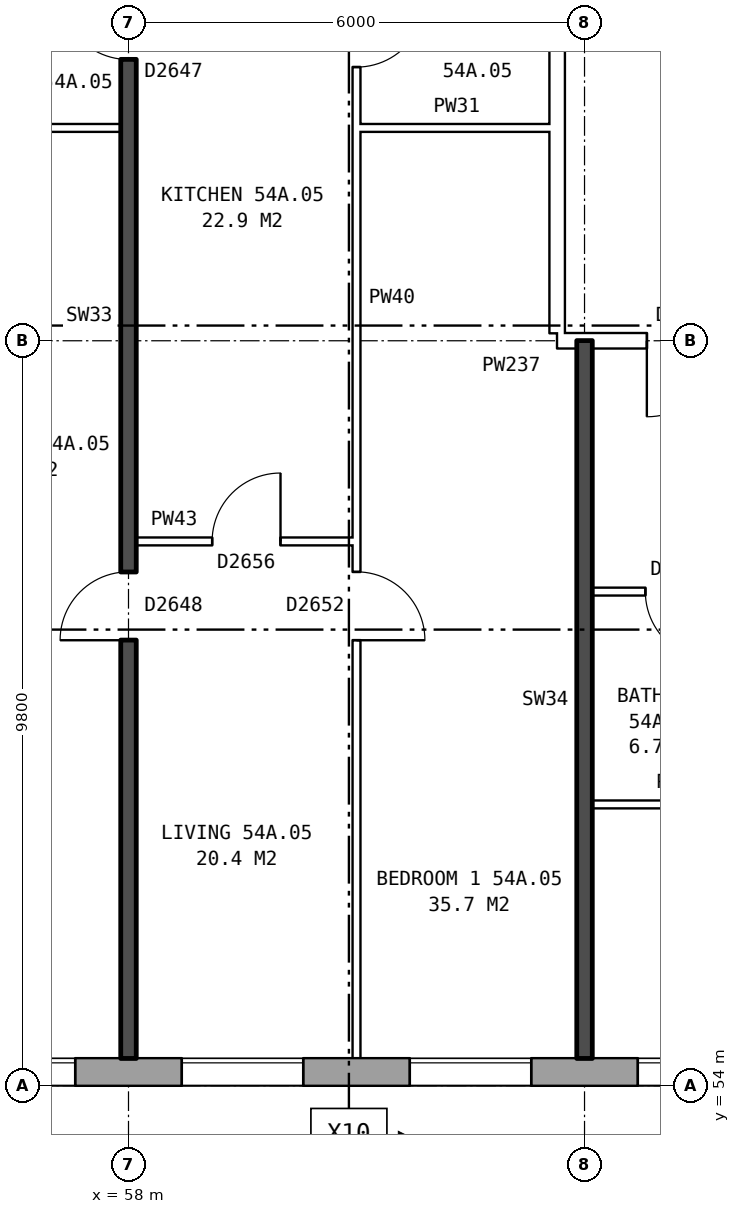
"""IFC4 building model, lengths in metres.
Left out: names, types, materials, properties, quantities, classifications, styles, units other than length and angle.
Written with IfcOpenShell. Run it as: python <this file> out.ifc"""

import sys

from ifc_helpers import new_model, si_unit, direction, frame, frame_2d, origin, place, context, subcontext, project, spatial, rectangle, extrude, element, fill, save


model = new_model("IFC4")
c1 = context("Model", 3, precision=1e-05, world=origin(), true_north=direction((0.0, 1.0)))
c2 = subcontext(c1, "Body", "Model", "MODEL_VIEW")
j1 = project(units=[si_unit("LENGTHUNIT", "METRE"), si_unit("PLANEANGLEUNIT", "RADIAN")], contexts=[c1])
p1 = place(None, origin())
s1 = spatial("IfcSite", under=j1, at=p1, CompositionType="ELEMENT")
p2 = place(p1, origin())
s2 = spatial("IfcBuilding", under=s1, at=p2, CompositionType="ELEMENT")
p3 = place(p2, frame((0.0, 0.0, 191.3)))
s3 = spatial("IfcBuildingStorey", under=s2, at=p3, CompositionType="ELEMENT", Elevation=191.3)
p4 = place(p3, frame((33.325, 54.18, 0.0), z_axis=(0.0, 0.0, 1.0), x_axis=(1.0, 0.0, 0.0)))
e1 = element("IfcWall", 1, at=p4, inside=s3, PredefinedType="STANDARD", context=c2, shape_type="SweptSolid", body=[
    extrude(rectangle(XDim=39.601, YDim=0.36, at=frame_2d((19.8, 0.0))), origin(), (0.0, 0.0, 1.0), 2.85),
])
p5 = place(p4, frame((1.375, 0.0, 0.8)))
e2 = element("IfcOpeningElement", 2, at=p5, cuts=e1, PredefinedType="OPENING", context=c2, shape_type="SweptSolid", body=[
    extrude(rectangle(XDim=1.6, YDim=1.8, at=frame_2d((0.8, 0.9))), frame((0.0, 0.19, 0.0), z_axis=(0.0, -1.0, 0.0), x_axis=(1.0, 0.0, 0.0)), (0.0, 0.0, 1.0), 0.38),
])
p6 = place(p4, frame((4.375, 0.0, 0.8)))
e3 = element("IfcOpeningElement", 3, at=p6, cuts=e1, PredefinedType="OPENING", context=c2, shape_type="SweptSolid", body=[
    extrude(rectangle(XDim=1.6, YDim=1.8, at=frame_2d((0.8, 0.9))), frame((0.0, 0.19, 0.0), z_axis=(0.0, -1.0, 0.0), x_axis=(1.0, 0.0, 0.0)), (0.0, 0.0, 1.0), 0.38),
])
p7 = place(p4, frame((7.375, 0.0, 0.8)))
e4 = element("IfcOpeningElement", 4, at=p7, cuts=e1, PredefinedType="OPENING", context=c2, shape_type="SweptSolid", body=[
    extrude(rectangle(XDim=1.6, YDim=1.8, at=frame_2d((0.8, 0.9))), frame((0.0, 0.19, 0.0), z_axis=(0.0, -1.0, 0.0), x_axis=(1.0, 0.0, 0.0)), (0.0, 0.0, 1.0), 0.38),
])
p8 = place(p4, frame((10.375, 0.0, 0.8)))
e5 = element("IfcOpeningElement", 5, at=p8, cuts=e1, PredefinedType="OPENING", context=c2, shape_type="SweptSolid", body=[
    extrude(rectangle(XDim=1.6, YDim=1.8, at=frame_2d((0.8, 0.9))), frame((0.0, 0.19, 0.0), z_axis=(0.0, -1.0, 0.0), x_axis=(1.0, 0.0, 0.0)), (0.0, 0.0, 1.0), 0.38),
])
p9 = place(p4, frame((13.375, 0.0, 0.8)))
e6 = element("IfcOpeningElement", 6, at=p9, cuts=e1, PredefinedType="OPENING", context=c2, shape_type="SweptSolid", body=[
    extrude(rectangle(XDim=1.6, YDim=1.8, at=frame_2d((0.8, 0.9))), frame((0.0, 0.19, 0.0), z_axis=(0.0, -1.0, 0.0), x_axis=(1.0, 0.0, 0.0)), (0.0, 0.0, 1.0), 0.38),
])
p10 = place(p4, frame((15.825, 0.0, 0.8)))
e7 = element("IfcOpeningElement", 7, at=p10, cuts=e1, PredefinedType="OPENING", context=c2, shape_type="SweptSolid", body=[
    extrude(rectangle(XDim=1.4, YDim=1.8, at=frame_2d((0.7, 0.9))), frame((0.0, 0.19, 0.0), z_axis=(0.0, -1.0, 0.0), x_axis=(1.0, 0.0, 0.0)), (0.0, 0.0, 1.0), 0.38),
])
p11 = place(p4, frame((18.975, 0.0, 0.15)))
e8 = element("IfcOpeningElement", 8, at=p11, cuts=e1, PredefinedType="OPENING", context=c2, shape_type="SweptSolid", body=[
    extrude(rectangle(XDim=1.6, YDim=1.2, at=frame_2d((0.8, 0.6))), frame((0.0, 0.19, 0.0), z_axis=(0.0, -1.0, 0.0), x_axis=(1.0, 0.0, 0.0)), (0.0, 0.0, 1.0), 0.38),
])
p12 = place(p4, frame((22.375, 0.0, 0.8)))
e9 = element("IfcOpeningElement", 9, at=p12, cuts=e1, PredefinedType="OPENING", context=c2, shape_type="SweptSolid", body=[
    extrude(rectangle(XDim=1.6, YDim=1.8, at=frame_2d((0.8, 0.9))), frame((0.0, 0.19, 0.0), z_axis=(0.0, -1.0, 0.0), x_axis=(1.0, 0.0, 0.0)), (0.0, 0.0, 1.0), 0.38),
])
p13 = place(p4, frame((25.375, 0.0, 0.8)))
e10 = element("IfcOpeningElement", 10, at=p13, cuts=e1, PredefinedType="OPENING", context=c2, shape_type="SweptSolid", body=[
    extrude(rectangle(XDim=1.6, YDim=1.8, at=frame_2d((0.8, 0.9))), frame((0.0, 0.19, 0.0), z_axis=(0.0, -1.0, 0.0), x_axis=(1.0, 0.0, 0.0)), (0.0, 0.0, 1.0), 0.38),
])
p14 = place(p4, frame((28.375, 0.0, 0.8)))
e11 = element("IfcOpeningElement", 11, at=p14, cuts=e1, PredefinedType="OPENING", context=c2, shape_type="SweptSolid", body=[
    extrude(rectangle(XDim=1.6, YDim=1.8, at=frame_2d((0.8, 0.9))), frame((0.0, 0.19, 0.0), z_axis=(0.0, -1.0, 0.0), x_axis=(1.0, 0.0, 0.0)), (0.0, 0.0, 1.0), 0.38),
])
p15 = place(p4, frame((31.375, 0.0, 0.8)))
e12 = element("IfcOpeningElement", 12, at=p15, cuts=e1, PredefinedType="OPENING", context=c2, shape_type="SweptSolid", body=[
    extrude(rectangle(XDim=1.6, YDim=1.8, at=frame_2d((0.8, 0.9))), frame((0.0, 0.19, 0.0), z_axis=(0.0, -1.0, 0.0), x_axis=(1.0, 0.0, 0.0)), (0.0, 0.0, 1.0), 0.38),
])
p16 = place(p4, frame((34.375, 0.0, 0.8)))
e13 = element("IfcOpeningElement", 13, at=p16, cuts=e1, PredefinedType="OPENING", context=c2, shape_type="SweptSolid", body=[
    extrude(rectangle(XDim=1.6, YDim=1.8, at=frame_2d((0.8, 0.9))), frame((0.0, 0.19, 0.0), z_axis=(0.0, -1.0, 0.0), x_axis=(1.0, 0.0, 0.0)), (0.0, 0.0, 1.0), 0.38),
])
p17 = place(p4, frame((37.375, 0.0, 0.8)))
e14 = element("IfcOpeningElement", 14, at=p17, cuts=e1, PredefinedType="OPENING", context=c2, shape_type="SweptSolid", body=[
    extrude(rectangle(XDim=1.6, YDim=1.8, at=frame_2d((0.8, 0.9))), frame((0.0, 0.19, 0.0), z_axis=(0.0, -1.0, 0.0), x_axis=(1.0, 0.0, 0.0)), (0.0, 0.0, 1.0), 0.38),
])
p18 = place(p4, frame((17.525, 0.0, 1.6)))
e15 = element("IfcOpeningElement", 15, at=p18, cuts=e1, PredefinedType="OPENING", context=c2, shape_type="SweptSolid", body=[
    extrude(rectangle(XDim=0.6, YDim=0.9, at=frame_2d((0.3, 0.45))), frame((0.0, 0.19, 0.0), z_axis=(0.0, -1.0, 0.0), x_axis=(1.0, 0.0, 0.0)), (0.0, 0.0, 1.0), 0.38),
])
p19 = place(p3, frame((63.64, 63.9, 0.0), z_axis=(0.0, 0.0, 1.0), x_axis=(0.0, 1.0, 0.0)))
e16 = element("IfcWall", 16, at=p19, inside=s3, PredefinedType="PARTITIONING", context=c2, shape_type="SweptSolid", body=[
    extrude(rectangle(XDim=12.2, YDim=0.2, at=frame_2d((6.1, 0.0))), origin(), (0.0, 0.0, 1.0), 2.85),
])
p20 = place(p19, frame((5.1, 0.0, 0.0)))
e17 = element("IfcOpeningElement", 17, at=p20, cuts=e16, PredefinedType="OPENING", context=c2, shape_type="SweptSolid", body=[
    extrude(rectangle(XDim=2.0, YDim=2.1, at=frame_2d((1.0, 1.05))), frame((0.0, 0.11, 0.0), z_axis=(0.0, -1.0, 0.0), x_axis=(1.0, 0.0, 0.0)), (0.0, 0.0, 1.0), 0.22),
])
p21 = place(p3, frame((64.1, 57.7, 0.0), z_axis=(0.0, 0.0, 1.0), x_axis=(1.0, 0.0, 0.0)))
e18 = element("IfcWall", 18, at=p21, inside=s3, PredefinedType="PARTITIONING", context=c2, shape_type="SweptSolid", body=[
    extrude(rectangle(XDim=2.3, YDim=0.1, at=frame_2d((1.15, 0.0))), origin(), (0.0, 0.0, 1.0), 2.85),
])
p22 = place(p3, frame((64.1, 60.5, 0.0), z_axis=(0.0, 0.0, 1.0), x_axis=(1.0, 0.0, 0.0)))
e19 = element("IfcWall", 19, at=p22, inside=s3, PredefinedType="PARTITIONING", context=c2, shape_type="SweptSolid", body=[
    extrude(rectangle(XDim=5.8, YDim=0.1, at=frame_2d((2.9, 0.0))), origin(), (0.0, 0.0, 1.0), 2.85),
])
p23 = place(p22, frame((3.6, 0.0, 0.0)))
e20 = element("IfcOpeningElement", 20, at=p23, cuts=e19, PredefinedType="OPENING", context=c2, shape_type="SweptSolid", body=[
    extrude(rectangle(XDim=0.9, YDim=2.1, at=frame_2d((0.45, 1.05))), frame((0.0, 0.06, 0.0), z_axis=(0.0, -1.0, 0.0), x_axis=(1.0, 0.0, 0.0)), (0.0, 0.0, 1.0), 0.12),
])
p24 = place(p22, frame((0.7, 0.0, 0.0)))
e21 = element("IfcOpeningElement", 21, at=p24, cuts=e19, PredefinedType="OPENING", context=c2, shape_type="SweptSolid", body=[
    extrude(rectangle(XDim=0.9, YDim=2.1, at=frame_2d((0.45, 1.05))), frame((0.0, 0.06, 0.0), z_axis=(0.0, -1.0, 0.0), x_axis=(1.0, 0.0, 0.0)), (0.0, 0.0, 1.0), 0.12),
])
p25 = place(p3, frame((58.1, 61.16, 0.0), z_axis=(0.0, 0.0, 1.0), x_axis=(1.0, 0.0, 0.0)))
e22 = element("IfcWall", 22, at=p25, inside=s3, PredefinedType="PARTITIONING", context=c2, shape_type="SweptSolid", body=[
    extrude(rectangle(XDim=2.9, YDim=0.1, at=frame_2d((1.45, 0.0))), origin(), (0.0, 0.0, 1.0), 2.85),
])
p26 = place(p25, frame((1.0, 0.0, 0.0)))
e23 = element("IfcOpeningElement", 23, at=p26, cuts=e22, PredefinedType="OPENING", context=c2, shape_type="SweptSolid", body=[
    extrude(rectangle(XDim=0.9, YDim=2.1, at=frame_2d((0.45, 1.05))), frame((0.0, 0.06, 0.0), z_axis=(0.0, -1.0, 0.0), x_axis=(1.0, 0.0, 0.0)), (0.0, 0.0, 1.0), 0.12),
])
p27 = place(p3, frame((63.64, 63.8, 0.0), z_axis=(0.0, 0.0, 1.0), x_axis=(1.0, 0.0, 0.0)))
e24 = element("IfcWall", 24, at=p27, inside=s3, PredefinedType="PARTITIONING", context=c2, shape_type="SweptSolid", body=[
    extrude(rectangle(XDim=3.0, YDim=0.2, at=frame_2d((1.5, 0.0))), origin(), (0.0, 0.0, 1.0), 2.85),
])
p28 = place(p27, frame((1.18, 0.0, 0.0)))
e25 = element("IfcOpeningElement", 25, at=p28, cuts=e24, PredefinedType="OPENING", context=c2, shape_type="SweptSolid", body=[
    extrude(rectangle(XDim=1.0, YDim=2.1, at=frame_2d((0.5, 1.05))), frame((0.0, 0.11, 0.0), z_axis=(0.0, -1.0, 0.0), x_axis=(1.0, 0.0, 0.0)), (0.0, 0.0, 1.0), 0.22),
])
p29 = place(p3, frame((55.1, 66.6, 0.0), z_axis=(0.0, 0.0, 1.0), x_axis=(1.0, 0.0, 0.0)))
e26 = element("IfcWall", 26, at=p29, inside=s3, PredefinedType="PARTITIONING", context=c2, shape_type="SweptSolid", body=[
    extrude(rectangle(XDim=2.8, YDim=0.1, at=frame_2d((1.4, 0.0))), origin(), (0.0, 0.0, 1.0), 2.85),
])
p30 = place(p3, frame((61.0, 66.6, 0.0), z_axis=(0.0, 0.0, 1.0), x_axis=(1.0, 0.0, 0.0)))
e27 = element("IfcWall", 27, at=p30, inside=s3, PredefinedType="PARTITIONING", context=c2, shape_type="SweptSolid", body=[
    extrude(rectangle(XDim=2.64, YDim=0.1, at=frame_2d((1.32, 0.0))), origin(), (0.0, 0.0, 1.0), 2.85),
])
p31 = place(p3, frame((58.0, 54.36, 0.0), z_axis=(0.0, 0.0, 1.0), x_axis=(0.0, 1.0, 0.0)))
e28 = element("IfcWall", 28, at=p31, inside=s3, PredefinedType="SOLIDWALL", context=c2, shape_type="SweptSolid", body=[
    extrude(rectangle(XDim=14.44, YDim=0.2, at=frame_2d((7.22, 0.0))), origin(), (0.0, 0.0, 1.0), 2.85),
])
p32 = place(p31, frame((5.5, 0.0, 0.0)))
e29 = element("IfcOpeningElement", 29, at=p32, cuts=e28, PredefinedType="OPENING", context=c2, shape_type="SweptSolid", body=[
    extrude(rectangle(XDim=0.9, YDim=2.1, at=frame_2d((0.45, 1.05))), frame((0.0, 0.11, 0.0), z_axis=(0.0, -1.0, 0.0), x_axis=(1.0, 0.0, 0.0)), (0.0, 0.0, 1.0), 0.22),
])
p33 = place(p31, frame((13.14, 0.0, 0.0)))
e30 = element("IfcOpeningElement", 30, at=p33, cuts=e28, PredefinedType="OPENING", context=c2, shape_type="SweptSolid", body=[
    extrude(rectangle(XDim=0.9, YDim=2.1, at=frame_2d((0.45, 1.05))), frame((0.0, 0.11, 0.0), z_axis=(0.0, -1.0, 0.0), x_axis=(1.0, 0.0, 0.0)), (0.0, 0.0, 1.0), 0.22),
])
p34 = place(p3, frame((61.0, 54.36, 0.0), z_axis=(0.0, 0.0, 1.0), x_axis=(0.0, 1.0, 0.0)))
e31 = element("IfcWall", 31, at=p34, inside=s3, PredefinedType="PARTITIONING", context=c2, shape_type="SweptSolid", body=[
    extrude(rectangle(XDim=14.34, YDim=0.1, at=frame_2d((7.17, 0.0))), origin(), (0.0, 0.0, 1.0), 2.85),
])
p35 = place(p34, frame((5.5, 0.0, 0.0)))
e32 = element("IfcOpeningElement", 32, at=p35, cuts=e31, PredefinedType="OPENING", context=c2, shape_type="SweptSolid", body=[
    extrude(rectangle(XDim=0.9, YDim=2.1, at=frame_2d((0.45, 1.05))), frame((0.0, 0.06, 0.0), z_axis=(0.0, -1.0, 0.0), x_axis=(1.0, 0.0, 0.0)), (0.0, 0.0, 1.0), 0.12),
])
p36 = place(p34, frame((13.04, 0.0, 0.0)))
e33 = element("IfcOpeningElement", 33, at=p36, cuts=e31, PredefinedType="OPENING", context=c2, shape_type="SweptSolid", body=[
    extrude(rectangle(XDim=0.9, YDim=2.1, at=frame_2d((0.45, 1.05))), frame((0.0, 0.06, 0.0), z_axis=(0.0, -1.0, 0.0), x_axis=(1.0, 0.0, 0.0)), (0.0, 0.0, 1.0), 0.12),
])
p37 = place(p3, frame((64.0, 54.36, 0.0), z_axis=(0.0, 0.0, 1.0), x_axis=(0.0, 1.0, 0.0)))
e34 = element("IfcWall", 34, at=p37, inside=s3, PredefinedType="SOLIDWALL", context=c2, shape_type="SweptSolid", body=[
    extrude(rectangle(XDim=9.44, YDim=0.2, at=frame_2d((4.72, 0.0))), origin(), (0.0, 0.0, 1.0), 2.85),
])
p38 = place(p12, origin())
e35 = element("IfcWindow", 35, at=p38, inside=s3, PartitioningType="SINGLE_PANEL", PredefinedType="WINDOW", context=c2, shape_type="SweptSolid", body=[
    extrude(rectangle(XDim=1.6, YDim=1.8, at=frame_2d((0.8, 0.9))), frame((0.0, 0.15, 0.0), z_axis=(0.0, -1.0, 0.0), x_axis=(1.0, 0.0, 0.0)), (0.0, 0.0, 1.0), 0.06),
])
fill(e9, e35)
p39 = place(p13, origin())
e36 = element("IfcWindow", 36, at=p39, inside=s3, PartitioningType="SINGLE_PANEL", PredefinedType="WINDOW", context=c2, shape_type="SweptSolid", body=[
    extrude(rectangle(XDim=1.6, YDim=1.8, at=frame_2d((0.8, 0.9))), frame((0.0, 0.15, 0.0), z_axis=(0.0, -1.0, 0.0), x_axis=(1.0, 0.0, 0.0)), (0.0, 0.0, 1.0), 0.06),
])
fill(e10, e36)
p40 = place(p14, origin())
e37 = element("IfcWindow", 37, at=p40, inside=s3, PartitioningType="SINGLE_PANEL", PredefinedType="WINDOW", context=c2, shape_type="SweptSolid", body=[
    extrude(rectangle(XDim=1.6, YDim=1.8, at=frame_2d((0.8, 0.9))), frame((0.0, 0.15, 0.0), z_axis=(0.0, -1.0, 0.0), x_axis=(1.0, 0.0, 0.0)), (0.0, 0.0, 1.0), 0.06),
])
fill(e11, e37)
p41 = place(p15, origin())
e38 = element("IfcWindow", 38, at=p41, inside=s3, PartitioningType="SINGLE_PANEL", PredefinedType="WINDOW", context=c2, shape_type="SweptSolid", body=[
    extrude(rectangle(XDim=1.6, YDim=1.8, at=frame_2d((0.8, 0.9))), frame((0.0, 0.15, 0.0), z_axis=(0.0, -1.0, 0.0), x_axis=(1.0, 0.0, 0.0)), (0.0, 0.0, 1.0), 0.06),
])
fill(e12, e38)
p42 = place(p28, frame((1.0, 0.0, 0.0), z_axis=(0.0, 0.0, 1.0), x_axis=(-1.0, 0.0, 0.0)))
e39 = element("IfcDoor", 39, at=p42, inside=s3, OperationType="SINGLE_SWING_RIGHT", PredefinedType="DOOR", context=c2, shape_type="SweptSolid", body=[
    extrude(rectangle(XDim=1.0, YDim=2.1, at=frame_2d((0.5, 1.05))), frame((0.0, 0.025, 0.0), z_axis=(0.0, -1.0, 0.0), x_axis=(1.0, 0.0, 0.0)), (0.0, 0.0, 1.0), 0.05),
])
fill(e25, e39)
p43 = place(p24, frame((0.9, 0.0, 0.0), z_axis=(0.0, 0.0, 1.0), x_axis=(-1.0, 0.0, 0.0)))
e40 = element("IfcDoor", 40, at=p43, inside=s3, OperationType="SINGLE_SWING_LEFT", PredefinedType="DOOR", context=c2, shape_type="SweptSolid", body=[
    extrude(rectangle(XDim=0.9, YDim=2.1, at=frame_2d((0.45, 1.05))), frame((0.0, 0.025, 0.0), z_axis=(0.0, -1.0, 0.0), x_axis=(1.0, 0.0, 0.0)), (0.0, 0.0, 1.0), 0.05),
])
fill(e21, e40)
p44 = place(p35, frame((0.9, 0.0, 0.0), z_axis=(0.0, 0.0, 1.0), x_axis=(-1.0, 0.0, 0.0)))
e41 = element("IfcDoor", 41, at=p44, inside=s3, OperationType="SINGLE_SWING_RIGHT", PredefinedType="DOOR", context=c2, shape_type="SweptSolid", body=[
    extrude(rectangle(XDim=0.9, YDim=2.1, at=frame_2d((0.45, 1.05))), frame((0.0, 0.025, 0.0), z_axis=(0.0, -1.0, 0.0), x_axis=(1.0, 0.0, 0.0)), (0.0, 0.0, 1.0), 0.05),
])
fill(e32, e41)
p45 = place(p32, origin())
e42 = element("IfcDoor", 42, at=p45, inside=s3, OperationType="SINGLE_SWING_LEFT", PredefinedType="DOOR", context=c2, shape_type="SweptSolid", body=[
    extrude(rectangle(XDim=0.9, YDim=2.1, at=frame_2d((0.45, 1.05))), frame((0.0, 0.025, 0.0), z_axis=(0.0, -1.0, 0.0), x_axis=(1.0, 0.0, 0.0)), (0.0, 0.0, 1.0), 0.05),
])
fill(e29, e42)
p46 = place(p26, origin())
e43 = element("IfcDoor", 43, at=p46, inside=s3, OperationType="SINGLE_SWING_RIGHT", PredefinedType="DOOR", context=c2, shape_type="SweptSolid", body=[
    extrude(rectangle(XDim=0.9, YDim=2.1, at=frame_2d((0.45, 1.05))), frame((0.0, 0.025, 0.0), z_axis=(0.0, -1.0, 0.0), x_axis=(1.0, 0.0, 0.0)), (0.0, 0.0, 1.0), 0.05),
])
fill(e23, e43)
p47 = place(p36, frame((0.9, 0.0, 0.0), z_axis=(0.0, 0.0, 1.0), x_axis=(-1.0, 0.0, 0.0)))
e44 = element("IfcDoor", 44, at=p47, inside=s3, OperationType="SINGLE_SWING_LEFT", PredefinedType="DOOR", context=c2, shape_type="SweptSolid", body=[
    extrude(rectangle(XDim=0.9, YDim=2.1, at=frame_2d((0.45, 1.05))), frame((0.0, 0.025, 0.0), z_axis=(0.0, -1.0, 0.0), x_axis=(1.0, 0.0, 0.0)), (0.0, 0.0, 1.0), 0.05),
])
fill(e33, e44)
p48 = place(p33, origin())
e45 = element("IfcDoor", 45, at=p48, inside=s3, OperationType="SINGLE_SWING_RIGHT", PredefinedType="DOOR", context=c2, shape_type="SweptSolid", body=[
    extrude(rectangle(XDim=0.9, YDim=2.1, at=frame_2d((0.45, 1.05))), frame((0.0, 0.025, 0.0), z_axis=(0.0, -1.0, 0.0), x_axis=(1.0, 0.0, 0.0)), (0.0, 0.0, 1.0), 0.05),
])
fill(e30, e45)
save(model, sys.argv[1])
